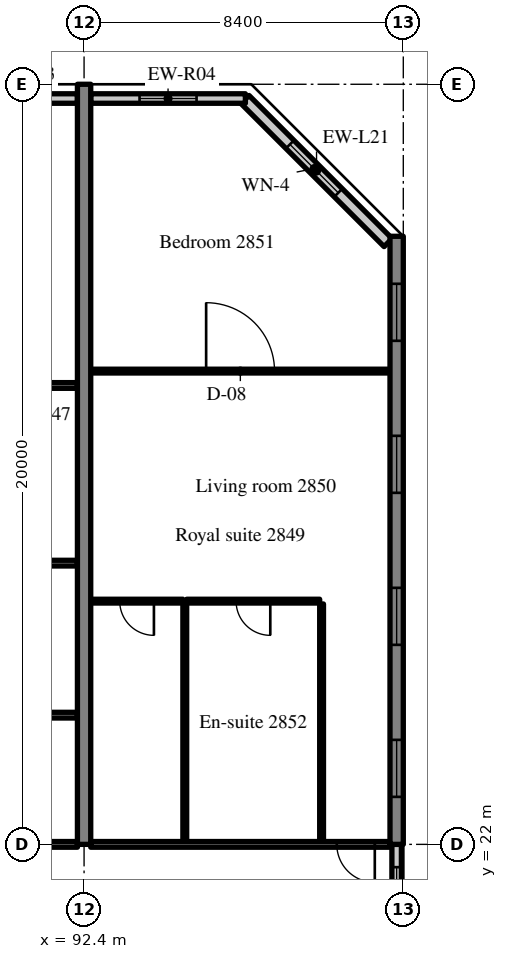
"""IFC4 building model, lengths in metres.
Left out: names, types, materials, properties, quantities, classifications, styles, units other than length and angle.
Written with IfcOpenShell. Run it as: python <this file> out.ifc"""

import sys

from ifc_helpers import new_model, si_unit, direction, frame, frame_2d, origin, place, context, subcontext, project, spatial, rectangle, extrude, source, transform, mapped, element, fill, save


model = new_model("IFC4")
c1 = context("Model", 3, precision=1e-05, world=origin(), true_north=direction((0.0, 1.0)))
c2 = subcontext(c1, "Body", "Model", "MODEL_VIEW")
j1 = project(units=[si_unit("LENGTHUNIT", "METRE"), si_unit("PLANEANGLEUNIT", "RADIAN")], contexts=[c1])
p1 = place(None, origin())
s1 = spatial("IfcSite", under=j1, at=p1, CompositionType="ELEMENT")
p2 = place(p1, origin())
s2 = spatial("IfcBuilding", under=s1, at=p2, CompositionType="ELEMENT")
p3 = place(p2, frame((0.0, 0.0, 118.0)))
s3 = spatial("IfcBuildingStorey", under=s2, at=p3, CompositionType="ELEMENT", Elevation=118.0)
m1 = source(origin(), c2, "Body", "SweptSolid", [
    extrude(rectangle(XDim=20.0, YDim=0.35, at=frame_2d((10.0, 0.0))), origin(), (0.0, 0.0, 1.0), 3.52),
])
p4 = place(p3, frame((92.4, 22.0, 0.0), z_axis=(0.0, 0.0, 1.0), x_axis=(0.0, 1.0, 0.0)))
e1 = element("IfcWall", 1, at=p4, inside=s3, PredefinedType="SHEAR", context=c2, shape_type="MappedRepresentation", body=[
    mapped(m1, transform((0.0, 0.0, 0.0), scale=1.0)),
])
m2 = source(origin(), c2, "Body", "SweptSolid", [
    extrude(rectangle(XDim=16.0, YDim=0.35, at=frame_2d((8.0, 0.0))), origin(), (0.0, 0.0, 1.0), 3.52),
])
p5 = place(p3, frame((100.625, 22.0, 0.0), z_axis=(0.0, 0.0, 1.0), x_axis=(0.0, 1.0, 0.0)))
e2 = element("IfcWall", 2, at=p5, inside=s3, PredefinedType="SHEAR", context=c2, shape_type="MappedRepresentation", body=[
    mapped(m2, transform((0.0, 0.0, 0.0), scale=1.0)),
])
m3 = source(origin(), c2, "Body", "SweptSolid", [
    extrude(rectangle(XDim=1.5, YDim=1.5, at=frame_2d((0.75, 0.75))), frame((0.0, 0.185, 0.0), z_axis=(0.0, -1.0, 0.0), x_axis=(1.0, 0.0, 0.0)), (0.0, 0.0, 1.0), 0.37),
])
p6 = place(p5, frame((1.25, 0.0, 0.9)))
e3 = element("IfcOpeningElement", 3, at=p6, cuts=e2, PredefinedType="OPENING", context=c2, shape_type="MappedRepresentation", body=[
    mapped(m3, transform((0.0, 0.0, 0.0), scale=1.0)),
])
p7 = place(p5, frame((5.25, 0.0, 0.9)))
e4 = element("IfcOpeningElement", 4, at=p7, cuts=e2, PredefinedType="OPENING", context=c2, shape_type="MappedRepresentation", body=[
    mapped(m3, transform((0.0, 0.0, 0.0), scale=1.0)),
])
p8 = place(p5, frame((9.25, 0.0, 0.9)))
e5 = element("IfcOpeningElement", 5, at=p8, cuts=e2, PredefinedType="OPENING", context=c2, shape_type="MappedRepresentation", body=[
    mapped(m3, transform((0.0, 0.0, 0.0), scale=1.0)),
])
p9 = place(p5, frame((13.25, 0.0, 0.9)))
e6 = element("IfcOpeningElement", 6, at=p9, cuts=e2, PredefinedType="OPENING", context=c2, shape_type="MappedRepresentation", body=[
    mapped(m3, transform((0.0, 0.0, 0.0), scale=1.0)),
])
m4 = source(origin(), c2, "Body", "SweptSolid", [
    extrude(rectangle(XDim=5.326, YDim=0.3, at=frame_2d((2.663, 0.0))), origin(), (0.0, 0.0, 1.0), 3.52),
])
p10 = place(p3, frame((100.4, 37.834, 0.0), z_axis=(0.0, 0.0, 1.0), x_axis=(-0.707083859269, 0.707129702361, 0.0)))
e7 = element("IfcWall", 7, at=p10, inside=s3, PredefinedType="SOLIDWALL", context=c2, shape_type="MappedRepresentation", body=[
    mapped(m4, transform((0.0, 0.0, 0.0), scale=1.0)),
])
m5 = source(origin(), c2, "Body", "SweptSolid", [
    extrude(rectangle(XDim=1.8, YDim=1.5, at=frame_2d((0.9, 0.75))), frame((0.0, 0.16, 0.0), z_axis=(0.0, -1.0, 0.0), x_axis=(1.0, 0.0, 0.0)), (0.0, 0.0, 1.0), 0.32),
])
p11 = place(p10, frame((1.854, 0.0, 0.9)))
e8 = element("IfcOpeningElement", 8, at=p11, cuts=e7, PredefinedType="OPENING", context=c2, shape_type="MappedRepresentation", body=[
    mapped(m5, transform((0.0, 0.0, 0.0), scale=1.0)),
])
m6 = source(origin(), c2, "Body", "SweptSolid", [
    extrude(rectangle(XDim=3.675, YDim=0.25, at=frame_2d((1.837, 0.0))), origin(), (0.0, 0.0, 1.0), 2.82),
])
p12 = place(p3, frame((92.225, 41.625, 0.0), z_axis=(0.0, 0.0, 1.0), x_axis=(-1.0, 0.0, 0.0)))
e9 = element("IfcWall", 9, at=p12, inside=s3, PredefinedType="SOLIDWALL", context=c2, shape_type="MappedRepresentation", body=[
    mapped(m6, transform((0.0, 0.0, 0.0), scale=1.0)),
])
m7 = source(origin(), c2, "Body", "SweptSolid", [
    extrude(rectangle(XDim=1.5, YDim=1.5, at=frame_2d((0.75, 0.75))), frame((0.0, 0.135, 0.0), z_axis=(0.0, -1.0, 0.0), x_axis=(1.0, 0.0, 0.0)), (0.0, 0.0, 1.0), 0.27),
])
p13 = place(p12, frame((1.087, 0.0, 0.9)))
e10 = element("IfcOpeningElement", 10, at=p13, cuts=e9, PredefinedType="OPENING", context=c2, shape_type="MappedRepresentation", body=[
    mapped(m7, transform((0.0, 0.0, 0.0), scale=1.0)),
])
m8 = source(origin(), c2, "Body", "SweptSolid", [
    extrude(rectangle(XDim=4.07, YDim=0.25, at=frame_2d((2.035, 0.0))), origin(), (0.0, 0.0, 1.0), 2.82),
])
p14 = place(p3, frame((96.645, 41.625, 0.0), z_axis=(0.0, 0.0, 1.0), x_axis=(-1.0, 0.0, 0.0)))
e11 = element("IfcWall", 11, at=p14, inside=s3, PredefinedType="SOLIDWALL", context=c2, shape_type="MappedRepresentation", body=[
    mapped(m8, transform((0.0, 0.0, 0.0), scale=1.0)),
])
p15 = place(p14, frame((1.285, 0.0, 0.9)))
e12 = element("IfcOpeningElement", 12, at=p15, cuts=e11, PredefinedType="OPENING", context=c2, shape_type="MappedRepresentation", body=[
    mapped(m7, transform((0.0, 0.0, 0.0), scale=1.0)),
])
m9 = source(origin(), c2, "Body", "SweptSolid", [
    extrude(rectangle(XDim=2.4, YDim=0.25, at=frame_2d((1.2, 0.0))), origin(), (0.0, 0.0, 1.0), 2.62),
])
p16 = place(p3, frame((100.625, 19.6, 0.0), z_axis=(0.0, 0.0, 1.0), x_axis=(0.0, 1.0, 0.0)))
e13 = element("IfcWall", 13, at=p16, inside=s3, PredefinedType="SOLIDWALL", context=c2, shape_type="MappedRepresentation", body=[
    mapped(m9, transform((0.0, 0.0, 0.0), scale=1.0)),
])
m10 = source(origin(), c2, "Body", "SweptSolid", [
    extrude(rectangle(XDim=1.2, YDim=1.5, at=frame_2d((0.6, 0.75))), frame((0.0, 0.135, 0.0), z_axis=(0.0, -1.0, 0.0), x_axis=(1.0, 0.0, 0.0)), (0.0, 0.0, 1.0), 0.27),
])
p17 = place(p16, frame((0.6, 0.0, 0.9)))
e14 = element("IfcOpeningElement", 14, at=p17, cuts=e13, PredefinedType="OPENING", context=c2, shape_type="MappedRepresentation", body=[
    mapped(m10, transform((0.0, 0.0, 0.0), scale=1.0)),
])
m11 = source(origin(), c2, "Body", "SweptSolid", [
    extrude(rectangle(XDim=5.5, YDim=0.15, at=frame_2d((2.75, 0.0))), origin(), (0.0, 0.0, 1.0), 2.82),
])
p18 = place(p3, frame((86.725, 22.0, 0.0), z_axis=(0.0, 0.0, 1.0), x_axis=(1.0, 0.0, 0.0)))
e15 = element("IfcWall", 15, at=p18, inside=s3, PredefinedType="PARTITIONING", context=c2, shape_type="MappedRepresentation", body=[
    mapped(m11, transform((0.0, 0.0, 0.0), scale=1.0)),
])
m12 = source(origin(), c2, "Body", "SweptSolid", [
    extrude(rectangle(XDim=5.5, YDim=0.15, at=frame_2d((2.75, 0.0))), origin(), (0.0, 0.0, 1.0), 3.52),
])
for number, where, z_axis, x_axis in (
    (16, (86.725, 25.4, 0.0), (0.0, 0.0, 1.0), (1.0, 0.0, 0.0)),
    (17, (86.725, 29.4, 0.0), (0.0, 0.0, 1.0), (1.0, 0.0, 0.0)),
):
    element("IfcWall", number, at=place(p3, frame(where, z_axis=z_axis, x_axis=x_axis)), inside=s3, PredefinedType="PARTITIONING", context=c2, shape_type="MappedRepresentation", body=[
        mapped(m12, transform((0.0, 0.0, 0.0), scale=1.0)),
    ])
m13 = source(origin(), c2, "Body", "SweptSolid", [
    extrude(rectangle(XDim=8.05, YDim=0.15, at=frame_2d((4.025, 0.0))), origin(), (0.0, 0.0, 1.0), 3.52),
])
p19 = place(p3, frame((84.175, 34.075, 0.0), z_axis=(0.0, 0.0, 1.0), x_axis=(1.0, 0.0, 0.0)))
e18 = element("IfcWall", 18, at=p19, inside=s3, PredefinedType="PARTITIONING", context=c2, shape_type="MappedRepresentation", body=[
    mapped(m13, transform((0.0, 0.0, 0.0), scale=1.0)),
])
m14 = source(origin(), c2, "Body", "SweptSolid", [
    extrude(rectangle(XDim=1.0, YDim=2.1, at=frame_2d((0.5, 1.05))), frame((0.0, 0.085, 0.0), z_axis=(0.0, -1.0, 0.0), x_axis=(1.0, 0.0, 0.0)), (0.0, 0.0, 1.0), 0.17),
])
p20 = place(p19, frame((0.7, 0.0, 0.0)))
e19 = element("IfcOpeningElement", 19, at=p20, cuts=e18, PredefinedType="OPENING", context=c2, shape_type="MappedRepresentation", body=[
    mapped(m14, transform((0.0, 0.0, 0.0), scale=1.0)),
])
m15 = source(origin(), c2, "Body", "SweptSolid", [
    extrude(rectangle(XDim=6.25, YDim=0.1, at=frame_2d((3.125, 0.0))), origin(), (0.0, 0.0, 1.0), 3.52),
])
for number, where, z_axis, x_axis in (
    (20, (98.65, 22.075, 0.0), (0.0, 0.0, 1.0), (0.0, 1.0, 0.0)),
    (21, (95.05, 22.075, 0.0), (0.0, 0.0, 1.0), (0.0, 1.0, 0.0)),
):
    element("IfcWall", number, at=place(p3, frame(where, z_axis=z_axis, x_axis=x_axis)), inside=s3, PredefinedType="PARTITIONING", context=c2, shape_type="MappedRepresentation", body=[
        mapped(m15, transform((0.0, 0.0, 0.0), scale=1.0)),
    ])
m16 = source(origin(), c2, "Body", "SweptSolid", [
    extrude(rectangle(XDim=3.5, YDim=0.1, at=frame_2d((1.75, 0.0))), origin(), (0.0, 0.0, 1.0), 3.52),
])
p21 = place(p3, frame((95.1, 28.4, 0.0), z_axis=(0.0, 0.0, 1.0), x_axis=(1.0, 0.0, 0.0)))
e22 = element("IfcWall", 22, at=p21, inside=s3, PredefinedType="PARTITIONING", context=c2, shape_type="MappedRepresentation", body=[
    mapped(m16, transform((0.0, 0.0, 0.0), scale=1.0)),
])
m17 = source(origin(), c2, "Body", "SweptSolid", [
    extrude(rectangle(XDim=0.9, YDim=2.1, at=frame_2d((0.45, 1.05))), frame((0.0, 0.06, 0.0), z_axis=(0.0, -1.0, 0.0), x_axis=(1.0, 0.0, 0.0)), (0.0, 0.0, 1.0), 0.12),
])
p22 = place(p21, frame((1.3, 0.0, 0.0)))
e23 = element("IfcOpeningElement", 23, at=p22, cuts=e22, PredefinedType="OPENING", context=c2, shape_type="MappedRepresentation", body=[
    mapped(m17, transform((0.0, 0.0, 0.0), scale=1.0)),
])
m18 = source(origin(), c2, "Body", "SweptSolid", [
    extrude(rectangle(XDim=2.425, YDim=0.1, at=frame_2d((1.212, 0.0))), origin(), (0.0, 0.0, 1.0), 3.52),
])
p23 = place(p3, frame((92.575, 28.4, 0.0), z_axis=(0.0, 0.0, 1.0), x_axis=(1.0, 0.0, 0.0)))
e24 = element("IfcWall", 24, at=p23, inside=s3, PredefinedType="PARTITIONING", context=c2, shape_type="MappedRepresentation", body=[
    mapped(m18, transform((0.0, 0.0, 0.0), scale=1.0)),
])
p24 = place(p23, frame((0.763, 0.0, 0.0)))
e25 = element("IfcOpeningElement", 25, at=p24, cuts=e24, PredefinedType="OPENING", context=c2, shape_type="MappedRepresentation", body=[
    mapped(m17, transform((0.0, 0.0, 0.0), scale=1.0)),
])
m19 = source(origin(), c2, "Body", "SweptSolid", [
    extrude(rectangle(XDim=7.875, YDim=0.1, at=frame_2d((3.938, 0.0))), origin(), (0.0, 0.0, 1.0), 3.52),
])
p25 = place(p3, frame((92.575, 34.453, 0.0), z_axis=(0.0, 0.0, 1.0), x_axis=(1.0, 0.0, 0.0)))
e26 = element("IfcWall", 26, at=p25, inside=s3, PredefinedType="PARTITIONING", context=c2, shape_type="MappedRepresentation", body=[
    mapped(m19, transform((0.0, 0.0, 0.0), scale=1.0)),
])
m20 = source(origin(), c2, "Body", "SweptSolid", [
    extrude(rectangle(XDim=1.8, YDim=2.1, at=frame_2d((0.9, 1.05))), frame((0.0, 0.06, 0.0), z_axis=(0.0, -1.0, 0.0), x_axis=(1.0, 0.0, 0.0)), (0.0, 0.0, 1.0), 0.12),
])
p26 = place(p25, frame((3.037, 0.0, 0.0)))
e27 = element("IfcOpeningElement", 27, at=p26, cuts=e26, PredefinedType="OPENING", context=c2, shape_type="MappedRepresentation", body=[
    mapped(m20, transform((0.0, 0.0, 0.0), scale=1.0)),
])
m21 = source(origin(), c2, "Body", "SweptSolid", [
    extrude(rectangle(XDim=7.875, YDim=0.15, at=frame_2d((3.938, 0.0))), origin(), (0.0, 0.0, 1.0), 2.82),
])
p27 = place(p3, frame((92.575, 22.0, 0.0), z_axis=(0.0, 0.0, 1.0), x_axis=(1.0, 0.0, 0.0)))
e28 = element("IfcWall", 28, at=p27, inside=s3, PredefinedType="PARTITIONING", context=c2, shape_type="MappedRepresentation", body=[
    mapped(m21, transform((0.0, 0.0, 0.0), scale=1.0)),
])
p28 = place(p27, frame((6.475, 0.0, 0.0)))
e29 = element("IfcOpeningElement", 29, at=p28, cuts=e28, PredefinedType="OPENING", context=c2, shape_type="MappedRepresentation", body=[
    mapped(m14, transform((0.0, 0.0, 0.0), scale=1.0)),
])
m22 = source(origin(), c2, "Body", "SweptSolid", [
    extrude(rectangle(XDim=1.8, YDim=1.5, at=frame_2d((0.9, 0.75))), frame((0.0, 0.03, 0.0), z_axis=(0.0, -1.0, 0.0), x_axis=(1.0, 0.0, 0.0)), (0.0, 0.0, 1.0), 0.06),
])
p29 = place(p11, origin())
e30 = element("IfcWindow", 30, at=p29, inside=s3, PartitioningType="SINGLE_PANEL", PredefinedType="WINDOW", context=c2, shape_type="MappedRepresentation", body=[
    mapped(m22, transform((0.0, 0.0, 0.0), scale=1.0)),
])
fill(e8, e30)
m23 = source(origin(), c2, "Body", "SweptSolid", [
    extrude(rectangle(XDim=1.5, YDim=1.5, at=frame_2d((0.75, 0.75))), frame((0.0, 0.03, 0.0), z_axis=(0.0, -1.0, 0.0), x_axis=(1.0, 0.0, 0.0)), (0.0, 0.0, 1.0), 0.06),
])
p30 = place(p15, origin())
e31 = element("IfcWindow", 31, at=p30, inside=s3, PartitioningType="SINGLE_PANEL", PredefinedType="WINDOW", context=c2, shape_type="MappedRepresentation", body=[
    mapped(m23, transform((0.0, 0.0, 0.0), scale=1.0)),
])
fill(e12, e31)
p31 = place(p6, origin())
e32 = element("IfcWindow", 32, at=p31, inside=s3, PartitioningType="SINGLE_PANEL", PredefinedType="WINDOW", context=c2, shape_type="MappedRepresentation", body=[
    mapped(m23, transform((0.0, 0.0, 0.0), scale=1.0)),
])
fill(e3, e32)
p32 = place(p7, origin())
e33 = element("IfcWindow", 33, at=p32, inside=s3, PartitioningType="SINGLE_PANEL", PredefinedType="WINDOW", context=c2, shape_type="MappedRepresentation", body=[
    mapped(m23, transform((0.0, 0.0, 0.0), scale=1.0)),
])
fill(e4, e33)
p33 = place(p8, origin())
e34 = element("IfcWindow", 34, at=p33, inside=s3, PartitioningType="SINGLE_PANEL", PredefinedType="WINDOW", context=c2, shape_type="MappedRepresentation", body=[
    mapped(m23, transform((0.0, 0.0, 0.0), scale=1.0)),
])
fill(e5, e34)
p34 = place(p9, origin())
e35 = element("IfcWindow", 35, at=p34, inside=s3, PartitioningType="SINGLE_PANEL", PredefinedType="WINDOW", context=c2, shape_type="MappedRepresentation", body=[
    mapped(m23, transform((0.0, 0.0, 0.0), scale=1.0)),
])
fill(e6, e35)
m24 = source(origin(), c2, "Body", "SweptSolid", [
    extrude(rectangle(XDim=1.2, YDim=1.5, at=frame_2d((0.6, 0.75))), frame((0.0, 0.03, 0.0), z_axis=(0.0, -1.0, 0.0), x_axis=(1.0, 0.0, 0.0)), (0.0, 0.0, 1.0), 0.06),
])
p35 = place(p17, origin())
e36 = element("IfcWindow", 36, at=p35, inside=s3, PartitioningType="SINGLE_PANEL", PredefinedType="WINDOW", context=c2, shape_type="MappedRepresentation", body=[
    mapped(m24, transform((0.0, 0.0, 0.0), scale=1.0)),
])
fill(e14, e36)
m25 = source(origin(), c2, "Body", "SweptSolid", [
    extrude(rectangle(XDim=0.9, YDim=2.1, at=frame_2d((0.45, 1.05))), frame((0.0, 0.025, 0.0), z_axis=(0.0, -1.0, 0.0), x_axis=(1.0, 0.0, 0.0)), (0.0, 0.0, 1.0), 0.05),
])
p36 = place(p22, origin())
e37 = element("IfcDoor", 37, at=p36, inside=s3, OperationType="SINGLE_SWING_RIGHT", PredefinedType="DOOR", context=c2, shape_type="MappedRepresentation", body=[
    mapped(m25, transform((0.0, 0.0, 0.0), scale=1.0)),
])
fill(e23, e37)
p37 = place(p24, origin())
e38 = element("IfcDoor", 38, at=p37, inside=s3, OperationType="SINGLE_SWING_RIGHT", PredefinedType="DOOR", context=c2, shape_type="MappedRepresentation", body=[
    mapped(m25, transform((0.0, 0.0, 0.0), scale=1.0)),
])
fill(e25, e38)
m26 = source(origin(), c2, "Body", "SweptSolid", [
    extrude(rectangle(XDim=1.8, YDim=2.1, at=frame_2d((0.9, 1.05))), frame((0.0, 0.025, 0.0), z_axis=(0.0, -1.0, 0.0), x_axis=(1.0, 0.0, 0.0)), (0.0, 0.0, 1.0), 0.05),
])
p38 = place(p26, origin())
e39 = element("IfcDoor", 39, at=p38, inside=s3, OperationType="DOUBLE_DOOR_SINGLE_SWING", PredefinedType="DOOR", context=c2, shape_type="MappedRepresentation", body=[
    mapped(m26, transform((0.0, 0.0, 0.0), scale=1.0)),
])
fill(e27, e39)
m27 = source(origin(), c2, "Body", "SweptSolid", [
    extrude(rectangle(XDim=1.0, YDim=2.1, at=frame_2d((0.5, 1.05))), frame((0.0, 0.025, 0.0), z_axis=(0.0, -1.0, 0.0), x_axis=(1.0, 0.0, 0.0)), (0.0, 0.0, 1.0), 0.05),
])
p39 = place(p28, origin())
e40 = element("IfcDoor", 40, at=p39, inside=s3, OperationType="SINGLE_SWING_RIGHT", PredefinedType="DOOR", context=c2, shape_type="MappedRepresentation", body=[
    mapped(m27, transform((0.0, 0.0, 0.0), scale=1.0)),
])
fill(e29, e40)
save(model, sys.argv[1])
